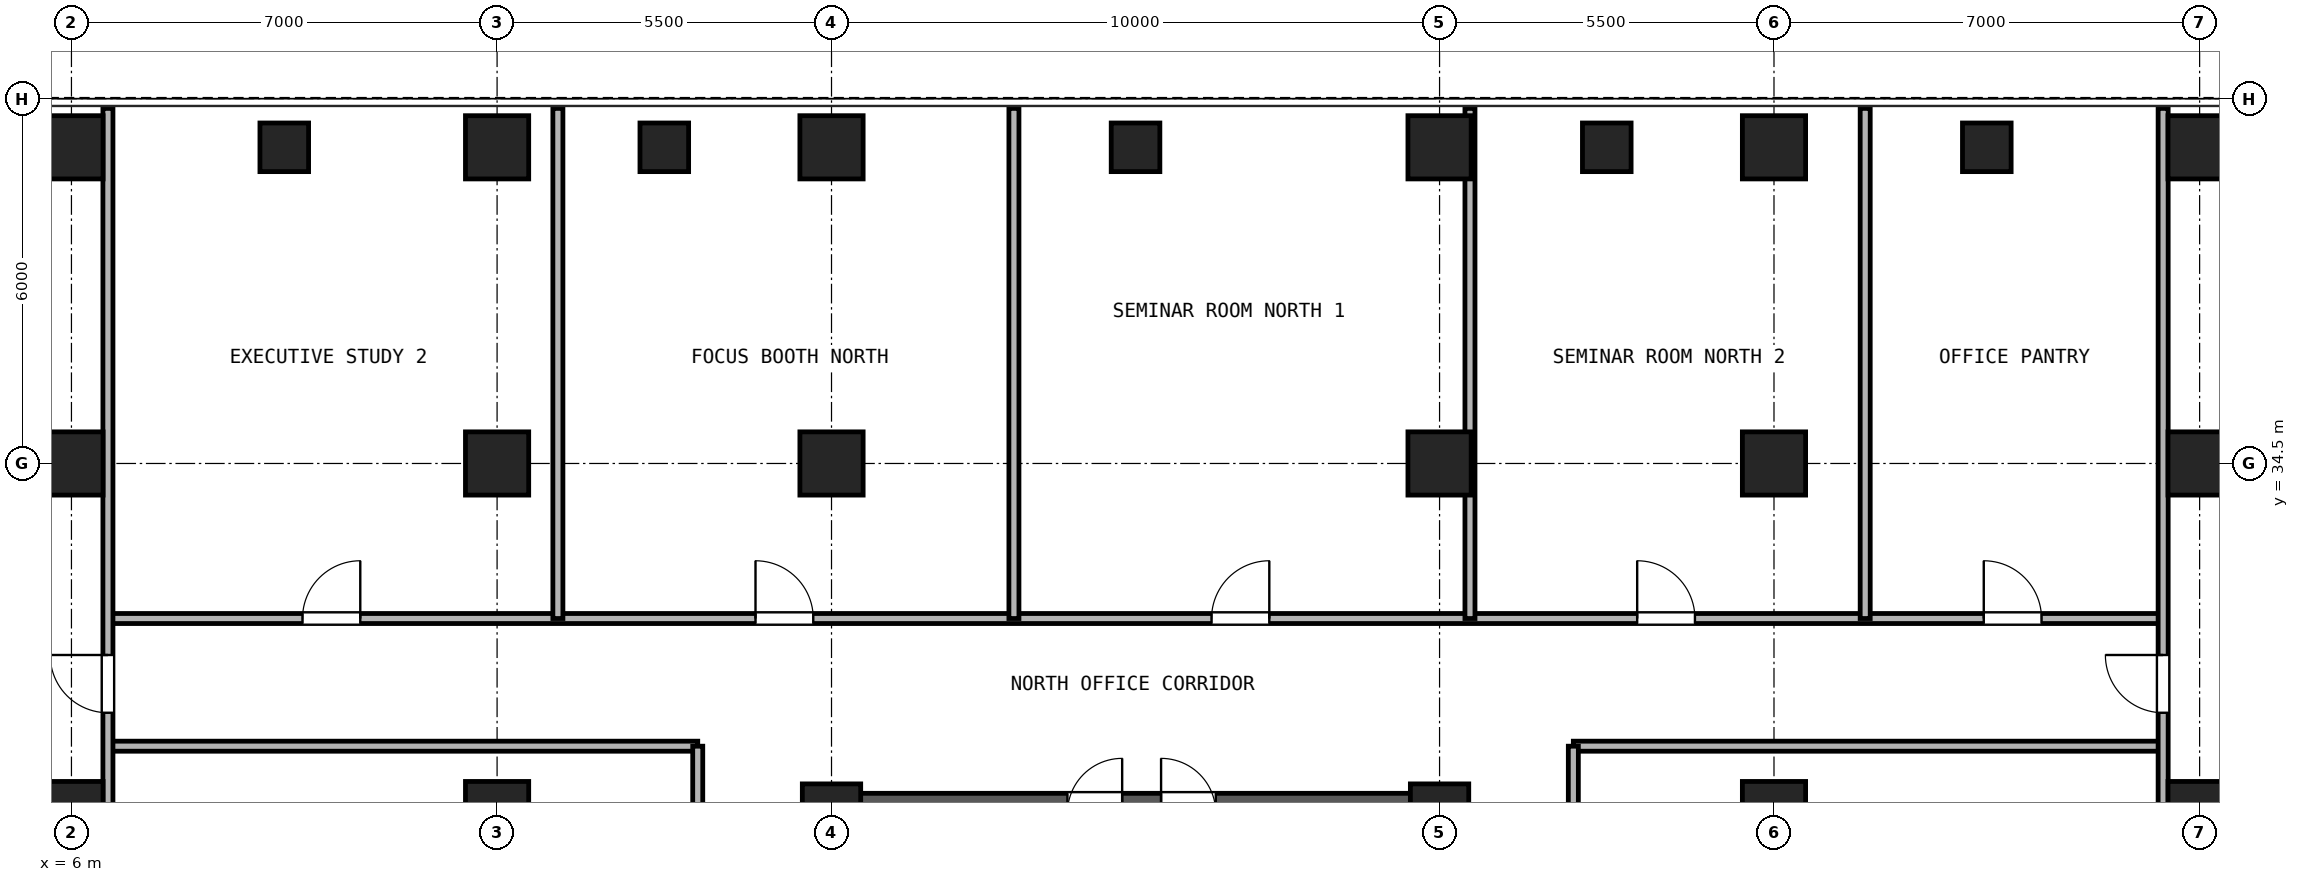
"""IFC4 building model, lengths in metres.
Left out: names, types, materials, properties, quantities, classifications, styles, units other than length and angle.
Written with IfcOpenShell. Run it as: python <this file> out.ifc"""

import sys

from ifc_helpers import new_model, si_unit, direction, frame, frame_2d, origin, origin_2d, place, context, subcontext, project, spatial, rectangle, hollow_rectangle, extrude, source, transform, mapped, element, fill, save


model = new_model("IFC4")
c1 = context("Model", 3, precision=1e-05, world=origin(), true_north=direction((0.0, 1.0)))
c2 = subcontext(c1, "Body", "Model", "MODEL_VIEW")
j1 = project(units=[si_unit("LENGTHUNIT", "METRE"), si_unit("PLANEANGLEUNIT", "RADIAN")], contexts=[c1])
p1 = place(None, origin())
s1 = spatial("IfcSite", under=j1, at=p1, CompositionType="ELEMENT")
p2 = place(p1, origin())
s2 = spatial("IfcBuilding", under=s1, at=p2, CompositionType="ELEMENT")
p3 = place(p2, frame((0.0, 0.0, 84.6)))
s3 = spatial("IfcBuildingStorey", under=s2, at=p3, CompositionType="ELEMENT", Elevation=84.6)
m1 = source(origin(), c2, "Body", "SweptSolid", [
    extrude(hollow_rectangle(XDim=1.04, YDim=1.04, WallThickness=0.065, at=origin_2d()), origin(), (0.0, 0.0, 1.0), 3.24),
])
for number, where, z_axis, x_axis in (
    (1, (6.0, 39.7, 0.0), (0.0, 0.0, 1.0), (1.0, 0.0, 0.0)),
    (2, (13.0, 39.7, 0.0), (0.0, 0.0, 1.0), (1.0, 0.0, 0.0)),
    (3, (18.5, 39.7, 0.0), (0.0, 0.0, 1.0), (1.0, 0.0, 0.0)),
    (4, (28.5, 39.7, 0.0), (0.0, 0.0, 1.0), (1.0, 0.0, 0.0)),
    (5, (34.0, 39.7, 0.0), (0.0, 0.0, 1.0), (1.0, 0.0, 0.0)),
    (6, (41.0, 39.7, 0.0), (0.0, 0.0, 1.0), (1.0, 0.0, 0.0)),
    (7, (6.0, 28.75, 0.0), (0.0, 0.0, 1.0), (1.0, 0.0, 0.0)),
    (8, (6.0, 34.5, 0.0), (0.0, 0.0, 1.0), (1.0, 0.0, 0.0)),
    (9, (13.0, 28.75, 0.0), (0.0, 0.0, 1.0), (1.0, 0.0, 0.0)),
    (10, (13.0, 34.5, 0.0), (0.0, 0.0, 1.0), (1.0, 0.0, 0.0)),
):
    element("IfcColumn", number, at=place(p3, frame(where, z_axis=z_axis, x_axis=x_axis)), inside=s3, PredefinedType="COLUMN", context=c2, shape_type="MappedRepresentation", body=[
        mapped(m1, transform((0.0, 0.0, 0.0), x_axis=(1.0, 0.0, 0.0), y_axis=(0.0, 1.0, 0.0), z_axis=(0.0, 0.0, 1.0), scale=1.0)),
    ])
m2 = source(origin(), c2, "Body", "SweptSolid", [
    extrude(hollow_rectangle(XDim=0.96, YDim=0.96, WallThickness=0.06, at=origin_2d()), origin(), (0.0, 0.0, 1.0), 3.24),
])
p4 = place(p3, frame((18.5, 28.75, 0.0), z_axis=(0.0, 0.0, 1.0), x_axis=(1.0, 0.0, 0.0)))
e11 = element("IfcColumn", 11, at=p4, inside=s3, PredefinedType="COLUMN", context=c2, shape_type="MappedRepresentation", body=[
    mapped(m2, transform((0.0, 0.0, 0.0), x_axis=(1.0, 0.0, 0.0), y_axis=(0.0, 1.0, 0.0), z_axis=(0.0, 0.0, 1.0), scale=1.0)),
])
p5 = place(p3, frame((18.5, 34.5, 0.0), z_axis=(0.0, 0.0, 1.0), x_axis=(1.0, 0.0, 0.0)))
e12 = element("IfcColumn", 12, at=p5, inside=s3, PredefinedType="COLUMN", context=c2, shape_type="MappedRepresentation", body=[
    mapped(m1, transform((0.0, 0.0, 0.0), x_axis=(1.0, 0.0, 0.0), y_axis=(0.0, 1.0, 0.0), z_axis=(0.0, 0.0, 1.0), scale=1.0)),
])
p6 = place(p3, frame((28.5, 28.75, 0.0), z_axis=(0.0, 0.0, 1.0), x_axis=(1.0, 0.0, 0.0)))
e13 = element("IfcColumn", 13, at=p6, inside=s3, PredefinedType="COLUMN", context=c2, shape_type="MappedRepresentation", body=[
    mapped(m2, transform((0.0, 0.0, 0.0), x_axis=(1.0, 0.0, 0.0), y_axis=(0.0, 1.0, 0.0), z_axis=(0.0, 0.0, 1.0), scale=1.0)),
])
for number, where, z_axis, x_axis in (
    (14, (28.5, 34.5, 0.0), (0.0, 0.0, 1.0), (1.0, 0.0, 0.0)),
    (15, (34.0, 28.75, 0.0), (0.0, 0.0, 1.0), (1.0, 0.0, 0.0)),
    (16, (34.0, 34.5, 0.0), (0.0, 0.0, 1.0), (1.0, 0.0, 0.0)),
    (17, (41.0, 28.75, 0.0), (0.0, 0.0, 1.0), (1.0, 0.0, 0.0)),
    (18, (41.0, 34.5, 0.0), (0.0, 0.0, 1.0), (1.0, 0.0, 0.0)),
):
    element("IfcColumn", number, at=place(p3, frame(where, z_axis=z_axis, x_axis=x_axis)), inside=s3, PredefinedType="COLUMN", context=c2, shape_type="MappedRepresentation", body=[
        mapped(m1, transform((0.0, 0.0, 0.0), x_axis=(1.0, 0.0, 0.0), y_axis=(0.0, 1.0, 0.0), z_axis=(0.0, 0.0, 1.0), scale=1.0)),
    ])
m3 = source(origin(), c2, "Body", "SweptSolid", [
    extrude(hollow_rectangle(XDim=0.8, YDim=0.8, WallThickness=0.045, at=origin_2d()), origin(), (0.0, 0.0, 1.0), 3.24),
])
for number, where, z_axis, x_axis in (
    (19, (9.5, 39.7, 0.0), (0.0, 0.0, 1.0), (1.0, 0.0, 0.0)),
    (20, (15.75, 39.7, 0.0), (0.0, 0.0, 1.0), (1.0, 0.0, 0.0)),
    (21, (23.5, 39.7, 0.0), (0.0, 0.0, 1.0), (1.0, 0.0, 0.0)),
    (22, (31.25, 39.7, 0.0), (0.0, 0.0, 1.0), (1.0, 0.0, 0.0)),
    (23, (37.5, 39.7, 0.0), (0.0, 0.0, 1.0), (1.0, 0.0, 0.0)),
):
    element("IfcColumn", number, at=place(p3, frame(where, z_axis=z_axis, x_axis=x_axis)), inside=s3, PredefinedType="COLUMN", context=c2, shape_type="MappedRepresentation", body=[
        mapped(m3, transform((0.0, 0.0, 0.0), x_axis=(1.0, 0.0, 0.0), y_axis=(0.0, 1.0, 0.0), z_axis=(0.0, 0.0, 1.0), scale=1.0)),
    ])
p7 = place(p3, frame((18.175, 28.75, 0.0), z_axis=(0.0, 0.0, 1.0), x_axis=(1.0, 0.0, 0.0)))
e24 = element("IfcWall", 24, at=p7, inside=s3, PredefinedType="SHEAR", context=c2, shape_type="SweptSolid", body=[
    extrude(rectangle(XDim=10.65, YDim=0.65, at=frame_2d((5.325, 0.0))), origin(), (0.0, 0.0, 1.0), 3.24),
])
p8 = place(p7, frame((4.205, 0.0, 0.0)))
e25 = element("IfcOpeningElement", 25, at=p8, cuts=e24, PredefinedType="OPENING", context=c2, shape_type="SweptSolid", body=[
    extrude(rectangle(XDim=0.9, YDim=2.05, at=frame_2d((0.45, 1.025))), frame((0.0, 0.335, 0.0), z_axis=(0.0, -1.0, 0.0), x_axis=(1.0, 0.0, 0.0)), (0.0, 0.0, 1.0), 0.67),
])
p9 = place(p7, frame((5.745, 0.0, 0.0)))
e26 = element("IfcOpeningElement", 26, at=p9, cuts=e24, PredefinedType="OPENING", context=c2, shape_type="SweptSolid", body=[
    extrude(rectangle(XDim=0.9, YDim=2.05, at=frame_2d((0.45, 1.025))), frame((0.0, 0.335, 0.0), z_axis=(0.0, -1.0, 0.0), x_axis=(1.0, 0.0, 0.0)), (0.0, 0.0, 1.0), 0.67),
])
p10 = place(p3, frame((6.6, 31.95, 0.0), z_axis=(0.0, 0.0, 1.0), x_axis=(1.0, 0.0, 0.0)))
e27 = element("IfcWall", 27, at=p10, inside=s3, PredefinedType="PARTITIONING", context=c2, shape_type="SweptSolid", body=[
    extrude(rectangle(XDim=33.8, YDim=0.165, at=frame_2d((16.9, 0.0))), origin(), (0.0, 0.0, 1.0), 3.24),
])
p11 = place(p10, frame((3.2, 0.0, 0.0)))
e28 = element("IfcOpeningElement", 28, at=p11, cuts=e27, PredefinedType="OPENING", context=c2, shape_type="SweptSolid", body=[
    extrude(rectangle(XDim=0.95, YDim=2.15, at=frame_2d((0.475, 1.075))), frame((0.0, 0.093, 0.0), z_axis=(0.0, -1.0, 0.0), x_axis=(1.0, 0.0, 0.0)), (0.0, 0.0, 1.0), 0.185),
])
p12 = place(p10, frame((10.65, 0.0, 0.0)))
e29 = element("IfcOpeningElement", 29, at=p12, cuts=e27, PredefinedType="OPENING", context=c2, shape_type="SweptSolid", body=[
    extrude(rectangle(XDim=0.95, YDim=2.15, at=frame_2d((0.475, 1.075))), frame((0.0, 0.093, 0.0), z_axis=(0.0, -1.0, 0.0), x_axis=(1.0, 0.0, 0.0)), (0.0, 0.0, 1.0), 0.185),
])
p13 = place(p10, frame((18.15, 0.0, 0.0)))
e30 = element("IfcOpeningElement", 30, at=p13, cuts=e27, PredefinedType="OPENING", context=c2, shape_type="SweptSolid", body=[
    extrude(rectangle(XDim=0.95, YDim=2.15, at=frame_2d((0.475, 1.075))), frame((0.0, 0.093, 0.0), z_axis=(0.0, -1.0, 0.0), x_axis=(1.0, 0.0, 0.0)), (0.0, 0.0, 1.0), 0.185),
])
p14 = place(p10, frame((25.15, 0.0, 0.0)))
e31 = element("IfcOpeningElement", 31, at=p14, cuts=e27, PredefinedType="OPENING", context=c2, shape_type="SweptSolid", body=[
    extrude(rectangle(XDim=0.95, YDim=2.15, at=frame_2d((0.475, 1.075))), frame((0.0, 0.093, 0.0), z_axis=(0.0, -1.0, 0.0), x_axis=(1.0, 0.0, 0.0)), (0.0, 0.0, 1.0), 0.185),
])
p15 = place(p10, frame((30.85, 0.0, 0.0)))
e32 = element("IfcOpeningElement", 32, at=p15, cuts=e27, PredefinedType="OPENING", context=c2, shape_type="SweptSolid", body=[
    extrude(rectangle(XDim=0.95, YDim=2.15, at=frame_2d((0.475, 1.075))), frame((0.0, 0.093, 0.0), z_axis=(0.0, -1.0, 0.0), x_axis=(1.0, 0.0, 0.0)), (0.0, 0.0, 1.0), 0.185),
])
for number, where, z_axis, x_axis in (
    (33, (6.6, 29.85, 0.0), (0.0, 0.0, 1.0), (1.0, 0.0, 0.0)),
    (34, (30.7, 29.85, 0.0), (0.0, 0.0, 1.0), (1.0, 0.0, 0.0)),
):
    element("IfcWall", number, at=place(p3, frame(where, z_axis=z_axis, x_axis=x_axis)), inside=s3, PredefinedType="PARTITIONING", context=c2, shape_type="SweptSolid", body=[
        extrude(rectangle(XDim=9.7, YDim=0.165, at=frame_2d((4.85, 0.0))), origin(), (0.0, 0.0, 1.0), 3.24),
    ])
p16 = place(p3, frame((16.3, 9.9, 0.0), z_axis=(0.0, 0.0, 1.0), x_axis=(0.0, 1.0, 0.0)))
e35 = element("IfcWall", 35, at=p16, inside=s3, PredefinedType="PARTITIONING", context=c2, shape_type="SweptSolid", body=[
    extrude(rectangle(XDim=19.95, YDim=0.165, at=frame_2d((9.975, 0.0))), origin(), (0.0, 0.0, 1.0), 3.24),
])
p17 = place(p16, frame((5.937, 0.0, 0.0)))
e36 = element("IfcOpeningElement", 36, at=p17, cuts=e35, PredefinedType="OPENING", context=c2, shape_type="SweptSolid", body=[
    extrude(rectangle(XDim=0.95, YDim=2.15, at=frame_2d((0.475, 1.075))), frame((0.0, 0.093, 0.0), z_axis=(0.0, -1.0, 0.0), x_axis=(1.0, 0.0, 0.0)), (0.0, 0.0, 1.0), 0.185),
])
p18 = place(p16, frame((15.911, 0.0, 0.0)))
e37 = element("IfcOpeningElement", 37, at=p18, cuts=e35, PredefinedType="OPENING", context=c2, shape_type="SweptSolid", body=[
    extrude(rectangle(XDim=0.95, YDim=2.15, at=frame_2d((0.475, 1.075))), frame((0.0, 0.093, 0.0), z_axis=(0.0, -1.0, 0.0), x_axis=(1.0, 0.0, 0.0)), (0.0, 0.0, 1.0), 0.185),
])
p19 = place(p3, frame((30.7, 9.9, 0.0), z_axis=(0.0, 0.0, 1.0), x_axis=(0.0, 1.0, 0.0)))
e38 = element("IfcWall", 38, at=p19, inside=s3, PredefinedType="PARTITIONING", context=c2, shape_type="SweptSolid", body=[
    extrude(rectangle(XDim=19.95, YDim=0.165, at=frame_2d((9.975, 0.0))), origin(), (0.0, 0.0, 1.0), 3.24),
])
p20 = place(p19, frame((9.475, 0.0, 0.0)))
e39 = element("IfcOpeningElement", 39, at=p20, cuts=e38, PredefinedType="OPENING", context=c2, shape_type="SweptSolid", body=[
    extrude(rectangle(XDim=0.95, YDim=2.15, at=frame_2d((0.475, 1.075))), frame((0.0, 0.093, 0.0), z_axis=(0.0, -1.0, 0.0), x_axis=(1.0, 0.0, 0.0)), (0.0, 0.0, 1.0), 0.185),
])
p21 = place(p3, frame((6.6, 0.16, 0.0), z_axis=(0.0, 0.0, 1.0), x_axis=(0.0, 1.0, 0.0)))
e40 = element("IfcWall", 40, at=p21, inside=s3, PredefinedType="PARTITIONING", context=c2, shape_type="SweptSolid", body=[
    extrude(rectangle(XDim=40.18, YDim=0.165, at=frame_2d((20.09, 0.0))), origin(), (0.0, 0.0, 1.0), 3.24),
])
p22 = place(p21, frame((8.19, 0.0, 0.0)))
e41 = element("IfcOpeningElement", 41, at=p22, cuts=e40, PredefinedType="OPENING", context=c2, shape_type="SweptSolid", body=[
    extrude(rectangle(XDim=0.95, YDim=2.15, at=frame_2d((0.475, 1.075))), frame((0.0, 0.093, 0.0), z_axis=(0.0, -1.0, 0.0), x_axis=(1.0, 0.0, 0.0)), (0.0, 0.0, 1.0), 0.185),
])
p23 = place(p21, frame((30.24, 0.0, 0.0)))
e42 = element("IfcOpeningElement", 42, at=p23, cuts=e40, PredefinedType="OPENING", context=c2, shape_type="SweptSolid", body=[
    extrude(rectangle(XDim=0.95, YDim=2.15, at=frame_2d((0.475, 1.075))), frame((0.0, 0.093, 0.0), z_axis=(0.0, -1.0, 0.0), x_axis=(1.0, 0.0, 0.0)), (0.0, 0.0, 1.0), 0.185),
])
p24 = place(p3, frame((40.4, 0.16, 0.0), z_axis=(0.0, 0.0, 1.0), x_axis=(0.0, 1.0, 0.0)))
e43 = element("IfcWall", 43, at=p24, inside=s3, PredefinedType="PARTITIONING", context=c2, shape_type="SweptSolid", body=[
    extrude(rectangle(XDim=40.18, YDim=0.165, at=frame_2d((20.09, 0.0))), origin(), (0.0, 0.0, 1.0), 3.24),
])
p25 = place(p24, frame((8.19, 0.0, 0.0)))
e44 = element("IfcOpeningElement", 44, at=p25, cuts=e43, PredefinedType="OPENING", context=c2, shape_type="SweptSolid", body=[
    extrude(rectangle(XDim=0.95, YDim=2.15, at=frame_2d((0.475, 1.075))), frame((0.0, 0.093, 0.0), z_axis=(0.0, -1.0, 0.0), x_axis=(1.0, 0.0, 0.0)), (0.0, 0.0, 1.0), 0.185),
])
p26 = place(p24, frame((30.24, 0.0, 0.0)))
e45 = element("IfcOpeningElement", 45, at=p26, cuts=e43, PredefinedType="OPENING", context=c2, shape_type="SweptSolid", body=[
    extrude(rectangle(XDim=0.95, YDim=2.15, at=frame_2d((0.475, 1.075))), frame((0.0, 0.093, 0.0), z_axis=(0.0, -1.0, 0.0), x_axis=(1.0, 0.0, 0.0)), (0.0, 0.0, 1.0), 0.185),
])
for number, where, z_axis, x_axis in (
    (46, (14.0, 31.95, 0.0), (0.0, 0.0, 1.0), (0.0, 1.0, 0.0)),
    (47, (21.5, 31.95, 0.0), (0.0, 0.0, 1.0), (0.0, 1.0, 0.0)),
    (48, (29.0, 31.95, 0.0), (0.0, 0.0, 1.0), (0.0, 1.0, 0.0)),
    (49, (35.5, 31.95, 0.0), (0.0, 0.0, 1.0), (0.0, 1.0, 0.0)),
):
    element("IfcWall", number, at=place(p3, frame(where, z_axis=z_axis, x_axis=x_axis)), inside=s3, PredefinedType="PARTITIONING", context=c2, shape_type="SweptSolid", body=[
        extrude(rectangle(XDim=8.39, YDim=0.165, at=frame_2d((4.195, 0.0))), origin(), (0.0, 0.0, 1.0), 3.24),
    ])
p27 = place(p11, origin())
e50 = element("IfcDoor", 50, at=p27, inside=s3, OperationType="SINGLE_SWING_RIGHT", PredefinedType="DOOR", context=c2, shape_type="SweptSolid", body=[
    extrude(rectangle(XDim=0.95, YDim=2.15, at=frame_2d((0.475, 1.075))), frame((0.0, 0.025, 0.0), z_axis=(0.0, -1.0, 0.0), x_axis=(1.0, 0.0, 0.0)), (0.0, 0.0, 1.0), 0.05),
])
fill(e28, e50)
p28 = place(p12, origin())
e51 = element("IfcDoor", 51, at=p28, inside=s3, OperationType="SINGLE_SWING_LEFT", PredefinedType="DOOR", context=c2, shape_type="SweptSolid", body=[
    extrude(rectangle(XDim=0.95, YDim=2.15, at=frame_2d((0.475, 1.075))), frame((0.0, 0.025, 0.0), z_axis=(0.0, -1.0, 0.0), x_axis=(1.0, 0.0, 0.0)), (0.0, 0.0, 1.0), 0.05),
])
fill(e29, e51)
p29 = place(p13, origin())
e52 = element("IfcDoor", 52, at=p29, inside=s3, OperationType="SINGLE_SWING_RIGHT", PredefinedType="DOOR", context=c2, shape_type="SweptSolid", body=[
    extrude(rectangle(XDim=0.95, YDim=2.15, at=frame_2d((0.475, 1.075))), frame((0.0, 0.025, 0.0), z_axis=(0.0, -1.0, 0.0), x_axis=(1.0, 0.0, 0.0)), (0.0, 0.0, 1.0), 0.05),
])
fill(e30, e52)
p30 = place(p14, origin())
e53 = element("IfcDoor", 53, at=p30, inside=s3, OperationType="SINGLE_SWING_LEFT", PredefinedType="DOOR", context=c2, shape_type="SweptSolid", body=[
    extrude(rectangle(XDim=0.95, YDim=2.15, at=frame_2d((0.475, 1.075))), frame((0.0, 0.025, 0.0), z_axis=(0.0, -1.0, 0.0), x_axis=(1.0, 0.0, 0.0)), (0.0, 0.0, 1.0), 0.05),
])
fill(e31, e53)
p31 = place(p15, origin())
e54 = element("IfcDoor", 54, at=p31, inside=s3, OperationType="SINGLE_SWING_LEFT", PredefinedType="DOOR", context=c2, shape_type="SweptSolid", body=[
    extrude(rectangle(XDim=0.95, YDim=2.15, at=frame_2d((0.475, 1.075))), frame((0.0, 0.025, 0.0), z_axis=(0.0, -1.0, 0.0), x_axis=(1.0, 0.0, 0.0)), (0.0, 0.0, 1.0), 0.05),
])
fill(e32, e54)
p32 = place(p23, frame((0.95, 0.0, 0.0), z_axis=(0.0, 0.0, 1.0), x_axis=(-1.0, 0.0, 0.0)))
e55 = element("IfcDoor", 55, at=p32, inside=s3, OperationType="SINGLE_SWING_RIGHT", PredefinedType="DOOR", context=c2, shape_type="SweptSolid", body=[
    extrude(rectangle(XDim=0.95, YDim=2.15, at=frame_2d((0.475, 1.075))), frame((0.0, 0.025, 0.0), z_axis=(0.0, -1.0, 0.0), x_axis=(1.0, 0.0, 0.0)), (0.0, 0.0, 1.0), 0.05),
])
fill(e42, e55)
p33 = place(p26, origin())
e56 = element("IfcDoor", 56, at=p33, inside=s3, OperationType="SINGLE_SWING_RIGHT", PredefinedType="DOOR", context=c2, shape_type="SweptSolid", body=[
    extrude(rectangle(XDim=0.95, YDim=2.15, at=frame_2d((0.475, 1.075))), frame((0.0, 0.025, 0.0), z_axis=(0.0, -1.0, 0.0), x_axis=(1.0, 0.0, 0.0)), (0.0, 0.0, 1.0), 0.05),
])
fill(e45, e56)
save(model, sys.argv[1])
